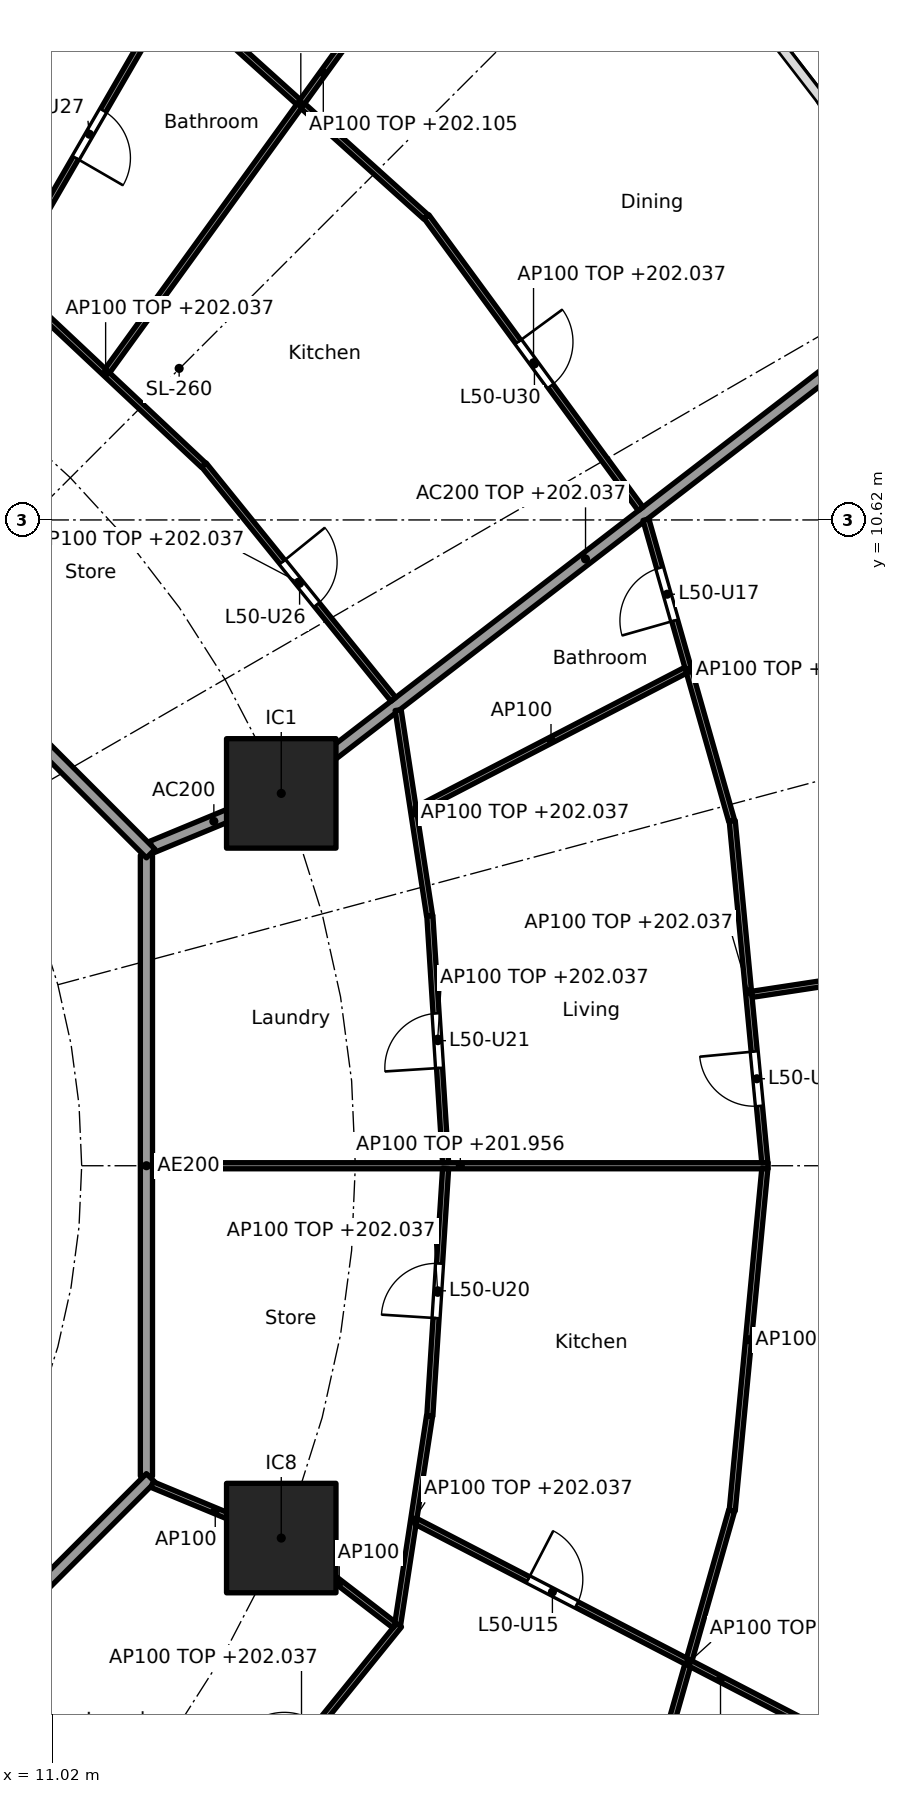
"""IFC4 building model, lengths in metres.
Left out: names, types, materials, properties, quantities, classifications, styles, units other than length and angle.
Written with IfcOpenShell. Run it as: python <this file> out.ifc"""

import sys

from ifc_helpers import new_model, si_unit, direction, frame, frame_2d, origin, origin_2d, place, context, subcontext, project, spatial, rectangle, extrude, element, fill, save


model = new_model("IFC4")
c1 = context("Model", 3, precision=1e-05, world=origin(), true_north=direction((0.0, 1.0)))
c2 = subcontext(c1, "Body", "Model", "MODEL_VIEW")
j1 = project(units=[si_unit("LENGTHUNIT", "METRE"), si_unit("PLANEANGLEUNIT", "RADIAN")], contexts=[c1])
p1 = place(None, origin())
s1 = spatial("IfcSite", under=j1, at=p1, CompositionType="ELEMENT")
p2 = place(p1, origin())
s2 = spatial("IfcBuilding", under=s1, at=p2, CompositionType="ELEMENT")
p3 = place(p2, frame((0.0, 0.0, 199.2)))
s3 = spatial("IfcBuildingStorey", under=s2, at=p3, CompositionType="ELEMENT", Elevation=199.2)
for number, where, z_axis, x_axis in (
    (1, (14.782, 6.123, 0.0), (0.0, 0.0, 1.0), (1.0, 0.0, 0.0)),
    (2, (14.782, -6.123, 0.0), (0.0, 0.0, 1.0), (1.0, 0.0, 0.0)),
):
    element("IfcColumn", number, at=place(p3, frame(where, z_axis=z_axis, x_axis=x_axis)), inside=s3, PredefinedType="COLUMN", context=c2, shape_type="SweptSolid", body=[
        extrude(rectangle(XDim=1.8, YDim=1.8, at=origin_2d()), origin(), (0.0, 0.0, 1.0), 3.7),
    ])
p4 = place(p3, frame((12.657, 5.243, 0.0), z_axis=(0.0, 0.0, 1.0), x_axis=(0.92383017907, 0.382802560388, 0.0)))
e3 = element("IfcWall", 3, at=p4, inside=s3, PredefinedType="PARTITIONING", context=c2, shape_type="SweptSolid", body=[
    extrude(rectangle(XDim=2.2, YDim=0.2, at=frame_2d((1.1, 0.0))), origin(), (0.0, 0.0, 1.0), 3.44),
])
p5 = place(p3, frame((14.822, 6.154, 0.0), z_axis=(0.0, 0.0, 1.0), x_axis=(0.792203056092, 0.610257583254, 0.0)))
e4 = element("IfcWall", 4, at=p5, inside=s3, PredefinedType="PARTITIONING", context=c2, shape_type="SweptSolid", body=[
    extrude(rectangle(XDim=12.533, YDim=0.2, at=frame_2d((6.266, 0.0))), origin(), (0.0, 0.0, 1.0), 2.837),
])
p6 = place(p3, frame((12.565, -5.104, 0.0), z_axis=(0.0, 0.0, 1.0), x_axis=(0.0, 1.0, 0.0)))
e5 = element("IfcWall", 5, at=p6, inside=s3, PredefinedType="PARTITIONING", context=c2, shape_type="SweptSolid", body=[
    extrude(rectangle(XDim=10.209, YDim=0.2, at=frame_2d((5.104, 0.0))), origin(), (0.0, 0.0, 1.0), 3.44),
])
p7 = place(p3, frame((12.635, 5.134, 0.0), z_axis=(0.0, 0.0, 1.0), x_axis=(-0.707106781187, 0.707106781187, 0.0)))
e6 = element("IfcWall", 6, at=p7, inside=s3, PredefinedType="PARTITIONING", context=c2, shape_type="SweptSolid", body=[
    extrude(rectangle(XDim=10.609, YDim=0.2, at=frame_2d((5.305, 0.0))), origin(), (0.0, 0.0, 1.0), 3.44),
])
p8 = place(p7, frame((8.274, 0.0, 0.0)))
e7 = element("IfcOpeningElement", 7, at=p8, cuts=e6, PredefinedType="OPENING", context=c2, shape_type="SweptSolid", body=[
    extrude(rectangle(XDim=1.0, YDim=2.1, at=frame_2d((0.5, 1.05))), frame((0.0, 0.11, 0.0), z_axis=(0.0, -1.0, 0.0), x_axis=(1.0, 0.0, 0.0)), (0.0, 0.0, 1.0), 0.22),
])
p9 = place(p3, frame((5.275, -12.494, 0.0), z_axis=(0.0, 0.0, 1.0), x_axis=(0.707106781187, 0.707106781187, 0.0)))
e8 = element("IfcWall", 8, at=p9, inside=s3, PredefinedType="PARTITIONING", context=c2, shape_type="SweptSolid", body=[
    extrude(rectangle(XDim=10.409, YDim=0.2, at=frame_2d((5.205, 0.0))), origin(), (0.0, 0.0, 1.0), 3.44),
])
p10 = place(p3, frame((12.665, 0.0, 0.0), z_axis=(0.0, 0.0, 1.0), x_axis=(1.0, 0.0, 0.0)))
e9 = element("IfcWall", 9, at=p10, inside=s3, PredefinedType="PARTITIONING", context=c2, shape_type="SweptSolid", body=[
    extrude(rectangle(XDim=10.124, YDim=0.1, at=frame_2d((5.062, 0.0))), origin(), (0.0, 0.0, 1.0), 2.756),
])
p11 = place(p3, frame((17.485, 0.05, 0.0), z_axis=(0.0, 0.0, 1.0), x_axis=(-0.063673473968, 0.997970785501, 0.0)))
e10 = element("IfcWall", 10, at=p11, inside=s3, PredefinedType="PARTITIONING", context=c2, shape_type="SweptSolid", body=[
    extrude(rectangle(XDim=4.072, YDim=0.1, at=frame_2d((2.036, 0.0))), origin(), (0.0, 0.0, 1.0), 2.837),
])
p12 = place(p11, frame((1.561, 0.0, 0.0)))
e11 = element("IfcOpeningElement", 11, at=p12, cuts=e10, PredefinedType="OPENING", context=c2, shape_type="SweptSolid", body=[
    extrude(rectangle(XDim=0.9, YDim=2.1, at=frame_2d((0.45, 1.05))), frame((0.0, 0.06, 0.0), z_axis=(0.0, -1.0, 0.0), x_axis=(1.0, 0.0, 0.0)), (0.0, 0.0, 1.0), 0.12),
])
p13 = place(p3, frame((17.485, -0.05, 0.0), z_axis=(0.0, 0.0, 1.0), x_axis=(-0.063673473968, -0.997970785501, 0.0)))
e12 = element("IfcWall", 12, at=p13, inside=s3, PredefinedType="PARTITIONING", context=c2, shape_type="SweptSolid", body=[
    extrude(rectangle(XDim=4.072, YDim=0.1, at=frame_2d((2.036, 0.0))), origin(), (0.0, 0.0, 1.0), 2.837),
])
p14 = place(p13, frame((1.561, 0.0, 0.0)))
e13 = element("IfcOpeningElement", 13, at=p14, cuts=e12, PredefinedType="OPENING", context=c2, shape_type="SweptSolid", body=[
    extrude(rectangle(XDim=0.9, YDim=2.1, at=frame_2d((0.45, 1.05))), frame((0.0, 0.06, 0.0), z_axis=(0.0, -1.0, 0.0), x_axis=(1.0, 0.0, 0.0)), (0.0, 0.0, 1.0), 0.12),
])
p15 = place(p3, frame((22.734, 0.05, 0.0), z_axis=(0.0, 0.0, 1.0), x_axis=(-0.0949274088, 0.995484197292, 0.0)))
e14 = element("IfcWall", 14, at=p15, inside=s3, PredefinedType="PARTITIONING", context=c2, shape_type="SweptSolid", body=[
    extrude(rectangle(XDim=5.648, YDim=0.1, at=frame_2d((2.824, 0.0))), origin(), (0.0, 0.0, 1.0), 2.837),
])
p16 = place(p15, frame((0.937, 0.0, 0.0)))
e15 = element("IfcOpeningElement", 15, at=p16, cuts=e14, PredefinedType="OPENING", context=c2, shape_type="SweptSolid", body=[
    extrude(rectangle(XDim=0.9, YDim=2.1, at=frame_2d((0.45, 1.05))), frame((0.0, 0.06, 0.0), z_axis=(0.0, -1.0, 0.0), x_axis=(1.0, 0.0, 0.0)), (0.0, 0.0, 1.0), 0.12),
])
p17 = place(p3, frame((22.734, -0.05, 0.0), z_axis=(0.0, 0.0, 1.0), x_axis=(-0.0949274088, -0.995484197292, 0.0)))
e16 = element("IfcWall", 16, at=p17, inside=s3, PredefinedType="PARTITIONING", context=c2, shape_type="SweptSolid", body=[
    extrude(rectangle(XDim=5.648, YDim=0.1, at=frame_2d((2.824, 0.0))), origin(), (0.0, 0.0, 1.0), 2.837),
])
p18 = place(p3, frame((22.521, 2.819, 0.0), z_axis=(0.0, 0.0, 1.0), x_axis=(0.988590363863, 0.150628989499, 0.0)))
e17 = element("IfcWall", 17, at=p18, inside=s3, PredefinedType="PARTITIONING", context=c2, shape_type="SweptSolid", body=[
    extrude(rectangle(XDim=6.269, YDim=0.1, at=frame_2d((3.135, 0.0))), origin(), (0.0, 0.0, 1.0), 2.905),
])
p19 = place(p18, frame((2.685, 0.0, 0.0)))
e18 = element("IfcOpeningElement", 18, at=p19, cuts=e17, PredefinedType="OPENING", context=c2, shape_type="SweptSolid", body=[
    extrude(rectangle(XDim=0.9, YDim=2.1, at=frame_2d((0.45, 1.05))), frame((0.0, 0.06, 0.0), z_axis=(0.0, -1.0, 0.0), x_axis=(1.0, 0.0, 0.0)), (0.0, 0.0, 1.0), 0.12),
])
p20 = place(p3, frame((17.221, 4.113, 0.0), z_axis=(0.0, 0.0, 1.0), x_axis=(-0.1510806336, 0.988521442434, 0.0)))
e19 = element("IfcWall", 19, at=p20, inside=s3, PredefinedType="PARTITIONING", context=c2, shape_type="SweptSolid", body=[
    extrude(rectangle(XDim=3.419, YDim=0.1, at=frame_2d((1.71, 0.0))), origin(), (0.0, 0.0, 1.0), 2.837),
])
p21 = place(p3, frame((22.189, 5.67, 0.0), z_axis=(0.0, 0.0, 1.0), x_axis=(-0.273819702124, 0.961781040949, 0.0)))
e20 = element("IfcWall", 20, at=p21, inside=s3, PredefinedType="PARTITIONING", context=c2, shape_type="SweptSolid", body=[
    extrude(rectangle(XDim=5.152, YDim=0.1, at=frame_2d((2.576, 0.0))), origin(), (0.0, 0.0, 1.0), 2.837),
])
p22 = place(p21, frame((3.426, 0.0, 0.0)))
e21 = element("IfcOpeningElement", 21, at=p22, cuts=e20, PredefinedType="OPENING", context=c2, shape_type="SweptSolid", body=[
    extrude(rectangle(XDim=0.9, YDim=2.1, at=frame_2d((0.45, 1.05))), frame((0.0, 0.06, 0.0), z_axis=(0.0, -1.0, 0.0), x_axis=(1.0, 0.0, 0.0)), (0.0, 0.0, 1.0), 0.12),
])
p23 = place(p3, frame((17.003, 5.851, 0.0), z_axis=(0.0, 0.0, 1.0), x_axis=(0.887654549419, 0.460509935719, 0.0)))
e22 = element("IfcWall", 22, at=p23, inside=s3, PredefinedType="PARTITIONING", context=c2, shape_type="SweptSolid", body=[
    extrude(rectangle(XDim=4.99, YDim=0.1, at=frame_2d((2.495, 0.0))), origin(), (0.0, 0.0, 1.0), 3.44),
])
p24 = place(p3, frame((16.626, 7.67, 0.0), z_axis=(0.0, 0.0, 1.0), x_axis=(-0.628764602857, 0.777595700987, 0.0)))
e23 = element("IfcWall", 23, at=p24, inside=s3, PredefinedType="PARTITIONING", context=c2, shape_type="SweptSolid", body=[
    extrude(rectangle(XDim=4.957, YDim=0.1, at=frame_2d((2.479, 0.0))), origin(), (0.0, 0.0, 1.0), 2.837),
])
p25 = place(p24, frame((2.004, 0.0, 0.0)))
e24 = element("IfcOpeningElement", 24, at=p25, cuts=e23, PredefinedType="OPENING", context=c2, shape_type="SweptSolid", body=[
    extrude(rectangle(XDim=0.9, YDim=2.1, at=frame_2d((0.45, 1.05))), frame((0.0, 0.06, 0.0), z_axis=(0.0, -1.0, 0.0), x_axis=(1.0, 0.0, 0.0)), (0.0, 0.0, 1.0), 0.12),
])
p26 = place(p3, frame((20.692, 10.802, 0.0), z_axis=(0.0, 0.0, 1.0), x_axis=(-0.591122127251, 0.806582066918, 0.0)))
e25 = element("IfcWall", 25, at=p26, inside=s3, PredefinedType="PARTITIONING", context=c2, shape_type="SweptSolid", body=[
    extrude(rectangle(XDim=5.96, YDim=0.1, at=frame_2d((2.98, 0.0))), origin(), (0.0, 0.0, 1.0), 2.837),
])
p27 = place(p26, frame((2.505, 0.0, 0.0)))
e26 = element("IfcOpeningElement", 26, at=p27, cuts=e25, PredefinedType="OPENING", context=c2, shape_type="SweptSolid", body=[
    extrude(rectangle(XDim=0.9, YDim=2.1, at=frame_2d((0.45, 1.05))), frame((0.0, 0.06, 0.0), z_axis=(0.0, -1.0, 0.0), x_axis=(1.0, 0.0, 0.0)), (0.0, 0.0, 1.0), 0.12),
])
p28 = place(p3, frame((13.504, 11.52, 0.0), z_axis=(0.0, 0.0, 1.0), x_axis=(-0.728885663674, 0.684635442619, 0.0)))
e27 = element("IfcWall", 27, at=p28, inside=s3, PredefinedType="PARTITIONING", context=c2, shape_type="SweptSolid", body=[
    extrude(rectangle(XDim=4.419, YDim=0.1, at=frame_2d((2.21, 0.0))), origin(), (0.0, 0.0, 1.0), 2.837),
])
p29 = place(p3, frame((17.162, 15.603, 0.0), z_axis=(0.0, 0.0, 1.0), x_axis=(-0.742790086539, 0.66952437397, 0.0)))
e28 = element("IfcWall", 28, at=p29, inside=s3, PredefinedType="PARTITIONING", context=c2, shape_type="SweptSolid", body=[
    extrude(rectangle(XDim=5.542, YDim=0.1, at=frame_2d((2.771, 0.0))), origin(), (0.0, 0.0, 1.0), 2.837),
])
p30 = place(p3, frame((11.923, 13.073, 0.0), z_axis=(0.0, 0.0, 1.0), x_axis=(0.586643945506, 0.809844973561, 0.0)))
e29 = element("IfcWall", 29, at=p30, inside=s3, PredefinedType="PARTITIONING", context=c2, shape_type="SweptSolid", body=[
    extrude(rectangle(XDim=12.104, YDim=0.1, at=frame_2d((6.052, 0.0))), origin(), (0.0, 0.0, 1.0), 2.905),
])
p31 = place(p30, frame((8.31, 0.0, 0.0)))
e30 = element("IfcOpeningElement", 30, at=p31, cuts=e29, PredefinedType="OPENING", context=c2, shape_type="SweptSolid", body=[
    extrude(rectangle(XDim=0.9, YDim=2.1, at=frame_2d((0.45, 1.05))), frame((0.0, 0.06, 0.0), z_axis=(0.0, -1.0, 0.0), x_axis=(1.0, 0.0, 0.0)), (0.0, 0.0, 1.0), 0.12),
])
p32 = place(p3, frame((7.708, 10.198, 0.0), z_axis=(0.0, 0.0, 1.0), x_axis=(0.501288100085, 0.865280440501, 0.0)))
e31 = element("IfcWall", 31, at=p32, inside=s3, PredefinedType="PARTITIONING", context=c2, shape_type="SweptSolid", body=[
    extrude(rectangle(XDim=10.623, YDim=0.1, at=frame_2d((5.312, 0.0))), origin(), (0.0, 0.0, 1.0), 2.756),
])
p33 = place(p32, frame((2.082, 0.0, 0.0)))
e32 = element("IfcOpeningElement", 32, at=p33, cuts=e31, PredefinedType="OPENING", context=c2, shape_type="SweptSolid", body=[
    extrude(rectangle(XDim=0.9, YDim=2.1, at=frame_2d((0.45, 1.05))), frame((0.0, 0.06, 0.0), z_axis=(0.0, -1.0, 0.0), x_axis=(1.0, 0.0, 0.0)), (0.0, 0.0, 1.0), 0.12),
])
p34 = place(p32, frame((7.369, 0.0, 0.0)))
e33 = element("IfcOpeningElement", 33, at=p34, cuts=e31, PredefinedType="OPENING", context=c2, shape_type="SweptSolid", body=[
    extrude(rectangle(XDim=0.9, YDim=2.1, at=frame_2d((0.45, 1.05))), frame((0.0, 0.06, 0.0), z_axis=(0.0, -1.0, 0.0), x_axis=(1.0, 0.0, 0.0)), (0.0, 0.0, 1.0), 0.12),
])
p35 = place(p3, frame((8.943, -8.966, 0.0), z_axis=(0.0, 0.0, 1.0), x_axis=(0.587181355751, -0.809455406714, 0.0)))
e34 = element("IfcWall", 34, at=p35, inside=s3, PredefinedType="PARTITIONING", context=c2, shape_type="SweptSolid", body=[
    extrude(rectangle(XDim=10.441, YDim=0.1, at=frame_2d((5.221, 0.0))), origin(), (0.0, 0.0, 1.0), 2.756),
])
p36 = place(p3, frame((13.509, -11.525, 0.0), z_axis=(0.0, 0.0, 1.0), x_axis=(0.628778729481, 0.777584277974, 0.0)))
e35 = element("IfcWall", 35, at=p36, inside=s3, PredefinedType="PARTITIONING", context=c2, shape_type="SweptSolid", body=[
    extrude(rectangle(XDim=5.107, YDim=0.1, at=frame_2d((2.554, 0.0))), origin(), (0.0, 0.0, 1.0), 2.837),
])
p37 = place(p36, frame((2.104, 0.0, 0.0)))
e36 = element("IfcOpeningElement", 36, at=p37, cuts=e35, PredefinedType="OPENING", context=c2, shape_type="SweptSolid", body=[
    extrude(rectangle(XDim=0.9, YDim=2.1, at=frame_2d((0.45, 1.05))), frame((0.0, 0.06, 0.0), z_axis=(0.0, -1.0, 0.0), x_axis=(1.0, 0.0, 0.0)), (0.0, 0.0, 1.0), 0.12),
])
p38 = place(p3, frame((12.657, -5.243, 0.0), z_axis=(0.0, 0.0, 1.0), x_axis=(0.923826362943, -0.382811769845, 0.0)))
e37 = element("IfcWall", 37, at=p38, inside=s3, PredefinedType="PARTITIONING", context=c2, shape_type="SweptSolid", body=[
    extrude(rectangle(XDim=2.25, YDim=0.1, at=frame_2d((1.125, 0.0))), origin(), (0.0, 0.0, 1.0), 3.44),
])
p39 = place(p3, frame((14.822, -6.154, 0.0), z_axis=(0.0, 0.0, 1.0), x_axis=(0.792226528082, -0.610227111987, 0.0)))
e38 = element("IfcWall", 38, at=p39, inside=s3, PredefinedType="PARTITIONING", context=c2, shape_type="SweptSolid", body=[
    extrude(rectangle(XDim=2.307, YDim=0.1, at=frame_2d((1.154, 0.0))), origin(), (0.0, 0.0, 1.0), 3.44),
])
p40 = place(p3, frame((16.697, -7.543, 0.0), z_axis=(0.0, 0.0, 1.0), x_axis=(0.151078880423, 0.988521710379, 0.0)))
e39 = element("IfcWall", 39, at=p40, inside=s3, PredefinedType="PARTITIONING", context=c2, shape_type="SweptSolid", body=[
    extrude(rectangle(XDim=3.469, YDim=0.1, at=frame_2d((1.735, 0.0))), origin(), (0.0, 0.0, 1.0), 2.837),
])
p41 = place(p3, frame((20.765, -10.673, 0.0), z_axis=(0.0, 0.0, 1.0), x_axis=(0.273815967041, 0.961782104322, 0.0)))
e40 = element("IfcWall", 40, at=p41, inside=s3, PredefinedType="PARTITIONING", context=c2, shape_type="SweptSolid", body=[
    extrude(rectangle(XDim=5.202, YDim=0.1, at=frame_2d((2.601, 0.0))), origin(), (0.0, 0.0, 1.0), 2.837),
])
p42 = place(p3, frame((17.003, -5.851, 0.0), z_axis=(0.0, 0.0, 1.0), x_axis=(0.888005628038, -0.4598325832, 0.0)))
e41 = element("IfcWall", 41, at=p42, inside=s3, PredefinedType="PARTITIONING", context=c2, shape_type="SweptSolid", body=[
    extrude(rectangle(XDim=11.266, YDim=0.1, at=frame_2d((5.633, 0.0))), origin(), (0.0, 0.0, 1.0), 2.905),
])
p43 = place(p42, frame((7.703, 0.0, 0.0)))
e42 = element("IfcOpeningElement", 42, at=p43, cuts=e41, PredefinedType="OPENING", context=c2, shape_type="SweptSolid", body=[
    extrude(rectangle(XDim=0.9, YDim=2.1, at=frame_2d((0.45, 1.05))), frame((0.0, 0.06, 0.0), z_axis=(0.0, -1.0, 0.0), x_axis=(1.0, 0.0, 0.0)), (0.0, 0.0, 1.0), 0.12),
])
p44 = place(p42, frame((2.07, 0.0, 0.0)))
e43 = element("IfcOpeningElement", 43, at=p44, cuts=e41, PredefinedType="OPENING", context=c2, shape_type="SweptSolid", body=[
    extrude(rectangle(XDim=0.9, YDim=2.1, at=frame_2d((0.45, 1.05))), frame((0.0, 0.06, 0.0), z_axis=(0.0, -1.0, 0.0), x_axis=(1.0, 0.0, 0.0)), (0.0, 0.0, 1.0), 0.12),
])
p45 = place(p44, origin())
e44 = element("IfcDoor", 44, at=p45, inside=s3, OperationType="SINGLE_SWING_LEFT", PredefinedType="DOOR", context=c2, shape_type="SweptSolid", body=[
    extrude(rectangle(XDim=0.9, YDim=2.1, at=frame_2d((0.45, 1.05))), frame((0.0, 0.025, 0.0), z_axis=(0.0, -1.0, 0.0), x_axis=(1.0, 0.0, 0.0)), (0.0, 0.0, 1.0), 0.05),
])
fill(e43, e44)
p46 = place(p16, origin())
e45 = element("IfcDoor", 45, at=p46, inside=s3, OperationType="SINGLE_SWING_RIGHT", PredefinedType="DOOR", context=c2, shape_type="SweptSolid", body=[
    extrude(rectangle(XDim=0.9, YDim=2.1, at=frame_2d((0.45, 1.05))), frame((0.0, 0.025, 0.0), z_axis=(0.0, -1.0, 0.0), x_axis=(1.0, 0.0, 0.0)), (0.0, 0.0, 1.0), 0.05),
])
fill(e15, e45)
p47 = place(p22, origin())
e46 = element("IfcDoor", 46, at=p47, inside=s3, OperationType="SINGLE_SWING_LEFT", PredefinedType="DOOR", context=c2, shape_type="SweptSolid", body=[
    extrude(rectangle(XDim=0.9, YDim=2.1, at=frame_2d((0.45, 1.05))), frame((0.0, 0.025, 0.0), z_axis=(0.0, -1.0, 0.0), x_axis=(1.0, 0.0, 0.0)), (0.0, 0.0, 1.0), 0.05),
])
fill(e21, e46)
p48 = place(p14, frame((0.9, 0.0, 0.0), x_axis=(-1.0, 0.0, 0.0)))
e47 = element("IfcDoor", 47, at=p48, inside=s3, OperationType="SINGLE_SWING_LEFT", PredefinedType="DOOR", context=c2, shape_type="SweptSolid", body=[
    extrude(rectangle(XDim=0.9, YDim=2.1, at=frame_2d((0.45, 1.05))), frame((0.0, 0.025, 0.0), z_axis=(0.0, -1.0, 0.0), x_axis=(1.0, 0.0, 0.0)), (0.0, 0.0, 1.0), 0.05),
])
fill(e13, e47)
p49 = place(p12, origin())
e48 = element("IfcDoor", 48, at=p49, inside=s3, OperationType="SINGLE_SWING_LEFT", PredefinedType="DOOR", context=c2, shape_type="SweptSolid", body=[
    extrude(rectangle(XDim=0.9, YDim=2.1, at=frame_2d((0.45, 1.05))), frame((0.0, 0.025, 0.0), z_axis=(0.0, -1.0, 0.0), x_axis=(1.0, 0.0, 0.0)), (0.0, 0.0, 1.0), 0.05),
])
fill(e11, e48)
p50 = place(p25, frame((0.9, 0.0, 0.0), x_axis=(-1.0, 0.0, 0.0)))
e49 = element("IfcDoor", 49, at=p50, inside=s3, OperationType="SINGLE_SWING_LEFT", PredefinedType="DOOR", context=c2, shape_type="SweptSolid", body=[
    extrude(rectangle(XDim=0.9, YDim=2.1, at=frame_2d((0.45, 1.05))), frame((0.0, 0.025, 0.0), z_axis=(0.0, -1.0, 0.0), x_axis=(1.0, 0.0, 0.0)), (0.0, 0.0, 1.0), 0.05),
])
fill(e24, e49)
p51 = place(p34, frame((0.9, 0.0, 0.0), x_axis=(-1.0, 0.0, 0.0)))
e50 = element("IfcDoor", 50, at=p51, inside=s3, OperationType="SINGLE_SWING_RIGHT", PredefinedType="DOOR", context=c2, shape_type="SweptSolid", body=[
    extrude(rectangle(XDim=0.9, YDim=2.1, at=frame_2d((0.45, 1.05))), frame((0.0, 0.025, 0.0), z_axis=(0.0, -1.0, 0.0), x_axis=(1.0, 0.0, 0.0)), (0.0, 0.0, 1.0), 0.05),
])
fill(e33, e50)
p52 = place(p27, frame((0.9, 0.0, 0.0), x_axis=(-1.0, 0.0, 0.0)))
e51 = element("IfcDoor", 51, at=p52, inside=s3, OperationType="SINGLE_SWING_LEFT", PredefinedType="DOOR", context=c2, shape_type="SweptSolid", body=[
    extrude(rectangle(XDim=0.9, YDim=2.1, at=frame_2d((0.45, 1.05))), frame((0.0, 0.025, 0.0), z_axis=(0.0, -1.0, 0.0), x_axis=(1.0, 0.0, 0.0)), (0.0, 0.0, 1.0), 0.05),
])
fill(e26, e51)
save(model, sys.argv[1])
